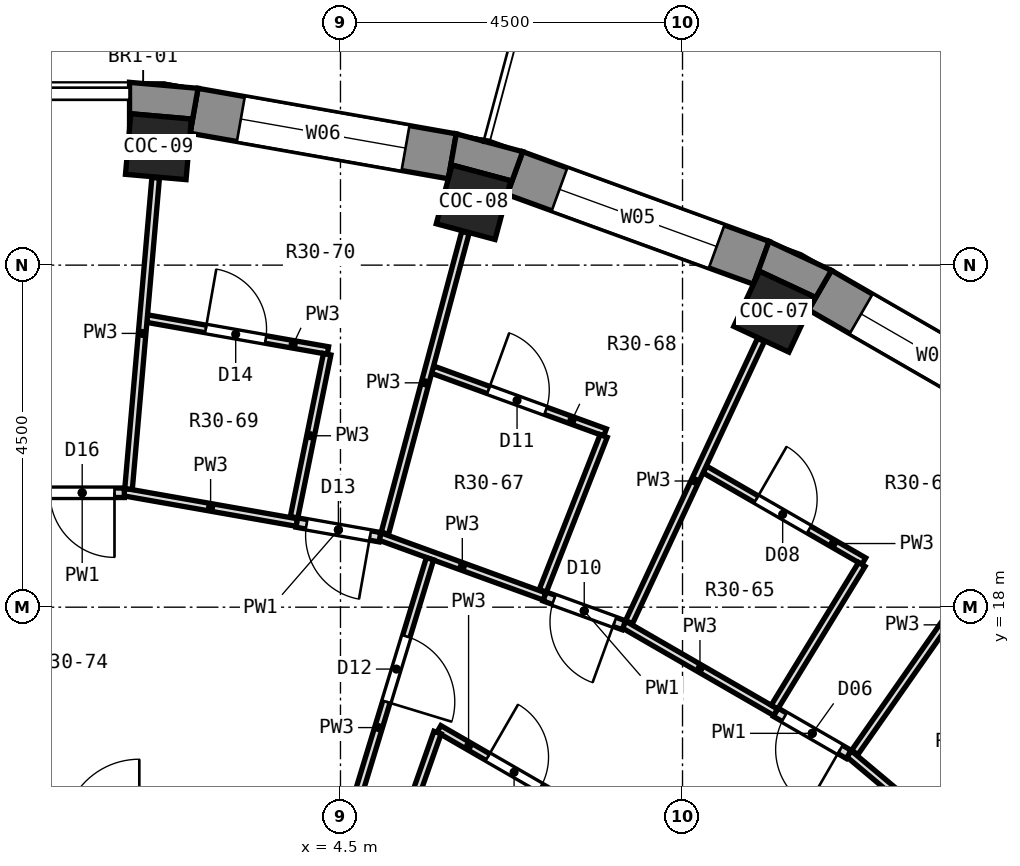
"""IFC4 building model, lengths in metres.
Left out: names, types, materials, properties, quantities, classifications, styles, units other than length and angle.
Written with IfcOpenShell. Run it as: python <this file> out.ifc"""

import sys

from ifc_helpers import new_model, si_unit, direction, frame, frame_2d, origin, origin_2d, place, context, subcontext, project, spatial, polyline, rectangle, outline, extrude, element, fill, save


model = new_model("IFC4")
c1 = context("Model", 3, precision=1e-05, world=origin(), true_north=direction((0.0, 1.0)))
c2 = subcontext(c1, "Body", "Model", "MODEL_VIEW")
j1 = project(units=[si_unit("LENGTHUNIT", "METRE"), si_unit("PLANEANGLEUNIT", "RADIAN")], contexts=[c1])
p1 = place(None, origin())
s1 = spatial("IfcSite", under=j1, at=p1, CompositionType="ELEMENT")
p2 = place(p1, origin())
s2 = spatial("IfcBuilding", under=s1, at=p2, CompositionType="ELEMENT")
p3 = place(p2, frame((0.0, 0.0, 210.3)))
s3 = spatial("IfcBuildingStorey", under=s2, at=p3, CompositionType="ELEMENT", Elevation=210.3)
for number, where, z_axis, x_axis in (
    (1, (10.206, 21.887, 0.0), (0.0, 0.0, 1.0), (0.423, 0.906, 0.0)),
    (2, (6.25, 23.327, 0.0), (0.0, 0.0, 1.0), (0.259, 0.966, 0.0)),
    (3, (2.105, 24.058, 0.0), (0.0, 0.0, 1.0), (0.087, 0.996, 0.0)),
):
    element("IfcColumn", number, at=place(p3, frame(where, z_axis=z_axis, x_axis=x_axis)), inside=s3, PredefinedType="COLUMN", context=c2, shape_type="SweptSolid", body=[
        extrude(rectangle(XDim=0.8, YDim=0.8, at=origin_2d()), origin(), (0.0, 0.0, 1.0), 3.3),
    ])
p4 = place(p3, frame((13.796, 20.446, 0.0), z_axis=(0.0, 0.0, 1.0), x_axis=(-0.86602648383, 0.499998129301, 0.0)))
e4 = element("IfcWall", 4, at=p4, inside=s3, PredefinedType="SOLIDWALL", context=c2, shape_type="SweptSolid", body=[
    extrude(rectangle(XDim=3.45, YDim=0.6, at=frame_2d((1.725, 0.0))), origin(), (0.0, 0.0, 1.0), 2.85),
])
p5 = place(p4, frame((0.625, 0.0, 0.9)))
e5 = element("IfcOpeningElement", 5, at=p5, cuts=e4, PredefinedType="OPENING", context=c2, shape_type="SweptSolid", body=[
    extrude(rectangle(XDim=2.2, YDim=1.8, at=frame_2d((1.1, 0.9))), frame((0.0, 0.312, 0.0), z_axis=(0.0, -1.0, 0.0), x_axis=(1.0, 0.0, 0.0)), (0.0, 0.0, 1.0), 0.624),
])
p6 = place(p3, frame((10.036, 22.531, 0.0), z_axis=(0.0, 0.0, 1.0), x_axis=(-0.93968799822, 0.342032843455, 0.0)))
e6 = element("IfcWall", 6, at=p6, inside=s3, PredefinedType="SOLIDWALL", context=c2, shape_type="SweptSolid", body=[
    extrude(rectangle(XDim=3.45, YDim=0.6, at=frame_2d((1.725, 0.0))), origin(), (0.0, 0.0, 1.0), 2.85),
])
p7 = place(p6, frame((0.625, 0.0, 0.9)))
e7 = element("IfcOpeningElement", 7, at=p7, cuts=e6, PredefinedType="OPENING", context=c2, shape_type="SweptSolid", body=[
    extrude(rectangle(XDim=2.2, YDim=1.8, at=frame_2d((1.1, 0.9))), frame((0.0, 0.312, 0.0), z_axis=(0.0, -1.0, 0.0), x_axis=(1.0, 0.0, 0.0)), (0.0, 0.0, 1.0), 0.624),
])
p8 = place(p3, frame((5.971, 23.932, 0.0), z_axis=(0.0, 0.0, 1.0), x_axis=(-0.984814892183, 0.173607684551, 0.0)))
e8 = element("IfcWall", 8, at=p8, inside=s3, PredefinedType="SOLIDWALL", context=c2, shape_type="SweptSolid", body=[
    extrude(rectangle(XDim=3.45, YDim=0.6, at=frame_2d((1.725, 0.0))), origin(), (0.0, 0.0, 1.0), 2.85),
])
p9 = place(p8, frame((0.625, 0.0, 0.9)))
e9 = element("IfcOpeningElement", 9, at=p9, cuts=e8, PredefinedType="OPENING", context=c2, shape_type="SweptSolid", body=[
    extrude(rectangle(XDim=2.2, YDim=1.8, at=frame_2d((1.1, 0.9))), frame((0.0, 0.312, 0.0), z_axis=(0.0, -1.0, 0.0), x_axis=(1.0, 0.0, 0.0)), (0.0, 0.0, 1.0), 0.624),
])
p10 = place(p3, origin())
e10 = element("IfcWall", 10, at=p10, inside=s3, PredefinedType="SOLIDWALL", context=c2, shape_type="SweptSolid", body=[
    extrude(outline(polyline([(10.139, 22.813), (9.934, 22.249), (10.013, 22.419), (10.738, 22.081), (10.659, 21.911), (10.959, 22.431), (10.139, 22.813)])), origin(), (0.0, 0.0, 1.0), 2.85),
])
p11 = place(p3, origin())
e11 = element("IfcWall", 11, at=p11, inside=s3, PredefinedType="SOLIDWALL", context=c2, shape_type="SweptSolid", body=[
    extrude(outline(polyline([(6.023, 24.227), (5.919, 23.636), (5.968, 23.817), (6.74, 23.61), (6.692, 23.429), (6.897, 23.993), (6.023, 24.227)])), origin(), (0.0, 0.0, 1.0), 2.85),
])
p12 = place(p3, origin())
e12 = element("IfcWall", 12, at=p12, inside=s3, PredefinedType="SOLIDWALL", context=c2, shape_type="SweptSolid", body=[
    extrude(outline(polyline([(2.626, 24.826), (1.725, 24.905), (1.725, 24.305), (1.741, 24.491), (2.538, 24.422), (2.522, 24.235), (2.626, 24.826)])), origin(), (0.0, 0.0, 1.0), 2.85),
])
p13 = place(p3, frame((11.191, 16.071, 0.0), z_axis=(0.0, 0.0, 1.0), x_axis=(0.766099024104, -0.642722556993, 0.0)))
e13 = element("IfcWall", 13, at=p13, inside=s3, PredefinedType="PARTITIONING", context=c2, shape_type="SweptSolid", body=[
    extrude(rectangle(XDim=2.305, YDim=0.1, at=frame_2d((1.153, 0.0))), origin(), (0.0, 0.0, 1.0), 2.85),
])
p14 = place(p3, frame((5.796, 16.399, 0.0), z_axis=(0.0, 0.0, 1.0), x_axis=(0.866084140742, -0.499898250802, 0.0)))
e14 = element("IfcWall", 14, at=p14, inside=s3, PredefinedType="PARTITIONING", context=c2, shape_type="SweptSolid", body=[
    extrude(rectangle(XDim=2.284, YDim=0.1, at=frame_2d((1.142, 0.0))), origin(), (0.0, 0.0, 1.0), 2.85),
])
p15 = place(p14, frame((0.741, 0.0, 0.0)))
e15 = element("IfcOpeningElement", 15, at=p15, cuts=e14, PredefinedType="OPENING", context=c2, shape_type="SweptSolid", body=[
    extrude(rectangle(XDim=0.8, YDim=2.1, at=frame_2d((0.4, 1.05))), frame((0.0, 0.062, 0.0), z_axis=(0.0, -1.0, 0.0), x_axis=(1.0, 0.0, 0.0)), (0.0, 0.0, 1.0), 0.124),
])
p16 = place(p3, frame((8.231, 17.771, 0.0), z_axis=(0.0, 0.0, 1.0), x_axis=(0.865906868937, -0.5002052522, 0.0)))
e16 = element("IfcWall", 16, at=p16, inside=s3, PredefinedType="PARTITIONING", context=c2, shape_type="SweptSolid", body=[
    extrude(rectangle(XDim=2.305, YDim=0.1, at=frame_2d((1.153, 0.0))), origin(), (0.0, 0.0, 1.0), 2.85),
])
p17 = place(p3, frame((10.227, 16.617, 0.0), z_axis=(0.0, 0.0, 1.0), x_axis=(0.865888396158, -0.500237229121, 0.0)))
e17 = element("IfcWall", 17, at=p17, inside=s3, PredefinedType="PARTITIONING", context=c2, shape_type="SweptSolid", body=[
    extrude(rectangle(XDim=1.108, YDim=0.125, at=frame_2d((0.554, 0.0))), origin(), (0.0, 0.0, 1.0), 2.85),
])
p18 = place(p17, frame((0.129, 0.0, 0.0)))
e18 = element("IfcOpeningElement", 18, at=p18, cuts=e17, PredefinedType="OPENING", context=c2, shape_type="SweptSolid", body=[
    extrude(rectangle(XDim=0.85, YDim=2.1, at=frame_2d((0.425, 1.05))), frame((0.0, 0.074, 0.0), z_axis=(0.0, -1.0, 0.0), x_axis=(1.0, 0.0, 0.0)), (0.0, 0.0, 1.0), 0.149),
])
p19 = place(p3, frame((9.293, 19.812, 0.0), z_axis=(0.0, 0.0, 1.0), x_axis=(0.866145191815, -0.499792463624, 0.0)))
e19 = element("IfcWall", 19, at=p19, inside=s3, PredefinedType="PARTITIONING", context=c2, shape_type="SweptSolid", body=[
    extrude(rectangle(XDim=2.415, YDim=0.1, at=frame_2d((1.208, 0.0))), origin(), (0.0, 0.0, 1.0), 2.85),
])
p20 = place(p19, frame((0.782, 0.0, 0.0)))
e20 = element("IfcOpeningElement", 20, at=p20, cuts=e19, PredefinedType="OPENING", context=c2, shape_type="SweptSolid", body=[
    extrude(rectangle(XDim=0.8, YDim=2.1, at=frame_2d((0.4, 1.05))), frame((0.0, 0.062, 0.0), z_axis=(0.0, -1.0, 0.0), x_axis=(1.0, 0.0, 0.0)), (0.0, 0.0, 1.0), 0.124),
])
p21 = place(p3, frame((5.02, 18.929, 0.0), z_axis=(0.0, 0.0, 1.0), x_axis=(0.939651079277, -0.342134256123, 0.0)))
e21 = element("IfcWall", 21, at=p21, inside=s3, PredefinedType="PARTITIONING", context=c2, shape_type="SweptSolid", body=[
    extrude(rectangle(XDim=2.305, YDim=0.1, at=frame_2d((1.152, 0.0))), origin(), (0.0, 0.0, 1.0), 2.85),
])
p22 = place(p3, frame((7.186, 18.141, 0.0), z_axis=(0.0, 0.0, 1.0), x_axis=(0.939793423488, -0.341743063087, 0.0)))
e22 = element("IfcWall", 22, at=p22, inside=s3, PredefinedType="PARTITIONING", context=c2, shape_type="SweptSolid", body=[
    extrude(rectangle(XDim=1.109, YDim=0.125, at=frame_2d((0.554, 0.0))), origin(), (0.0, 0.0, 1.0), 2.85),
])
p23 = place(p22, frame((0.129, 0.0, 0.0)))
e23 = element("IfcOpeningElement", 23, at=p23, cuts=e22, PredefinedType="OPENING", context=c2, shape_type="SweptSolid", body=[
    extrude(rectangle(XDim=0.85, YDim=2.1, at=frame_2d((0.425, 1.05))), frame((0.0, 0.074, 0.0), z_axis=(0.0, -1.0, 0.0), x_axis=(1.0, 0.0, 0.0)), (0.0, 0.0, 1.0), 0.149),
])
p24 = place(p3, frame((5.712, 21.125, 0.0), z_axis=(0.0, 0.0, 1.0), x_axis=(0.939692991858, -0.342019123812, 0.0)))
e24 = element("IfcWall", 24, at=p24, inside=s3, PredefinedType="PARTITIONING", context=c2, shape_type="SweptSolid", body=[
    extrude(rectangle(XDim=2.414, YDim=0.1, at=frame_2d((1.207, 0.0))), origin(), (0.0, 0.0, 1.0), 2.85),
])
p25 = place(p24, frame((0.782, 0.0, 0.0)))
e25 = element("IfcOpeningElement", 25, at=p25, cuts=e24, PredefinedType="OPENING", context=c2, shape_type="SweptSolid", body=[
    extrude(rectangle(XDim=0.8, YDim=2.1, at=frame_2d((0.4, 1.05))), frame((0.0, 0.062, 0.0), z_axis=(0.0, -1.0, 0.0), x_axis=(1.0, 0.0, 0.0)), (0.0, 0.0, 1.0), 0.124),
])
p26 = place(p3, frame((1.656, 19.514, 0.0), z_axis=(0.0, 0.0, 1.0), x_axis=(0.984783558818, -0.173785333909, 0.0)))
e26 = element("IfcWall", 26, at=p26, inside=s3, PredefinedType="PARTITIONING", context=c2, shape_type="SweptSolid", body=[
    extrude(rectangle(XDim=2.305, YDim=0.1, at=frame_2d((1.153, 0.0))), origin(), (0.0, 0.0, 1.0), 2.85),
])
p27 = place(p3, frame((3.926, 19.113, 0.0), z_axis=(0.0, 0.0, 1.0), x_axis=(0.984810132848, -0.173634680406, 0.0)))
e27 = element("IfcWall", 27, at=p27, inside=s3, PredefinedType="PARTITIONING", context=c2, shape_type="SweptSolid", body=[
    extrude(rectangle(XDim=1.109, YDim=0.125, at=frame_2d((0.555, 0.0))), origin(), (0.0, 0.0, 1.0), 2.85),
])
p28 = place(p27, frame((0.13, 0.0, 0.0)))
e28 = element("IfcOpeningElement", 28, at=p28, cuts=e27, PredefinedType="OPENING", context=c2, shape_type="SweptSolid", body=[
    extrude(rectangle(XDim=0.85, YDim=2.1, at=frame_2d((0.425, 1.05))), frame((0.0, 0.074, 0.0), z_axis=(0.0, -1.0, 0.0), x_axis=(1.0, 0.0, 0.0)), (0.0, 0.0, 1.0), 0.149),
])
p29 = place(p3, frame((1.957, 21.796, 0.0), z_axis=(0.0, 0.0, 1.0), x_axis=(0.984794754479, -0.173721879884, 0.0)))
e29 = element("IfcWall", 29, at=p29, inside=s3, PredefinedType="PARTITIONING", context=c2, shape_type="SweptSolid", body=[
    extrude(rectangle(XDim=2.414, YDim=0.1, at=frame_2d((1.207, 0.0))), origin(), (0.0, 0.0, 1.0), 2.85),
])
p30 = place(p29, frame((0.782, 0.0, 0.0)))
e30 = element("IfcOpeningElement", 30, at=p30, cuts=e29, PredefinedType="OPENING", context=c2, shape_type="SweptSolid", body=[
    extrude(rectangle(XDim=0.8, YDim=2.1, at=frame_2d((0.4, 1.05))), frame((0.0, 0.062, 0.0), z_axis=(0.0, -1.0, 0.0), x_axis=(1.0, 0.0, 0.0)), (0.0, 0.0, 1.0), 0.124),
])
p31 = place(p3, frame((0.548, 19.505, 0.0), z_axis=(0.0, 0.0, 1.0), x_axis=(1.0, 0.0, 0.0)))
e31 = element("IfcWall", 31, at=p31, inside=s3, PredefinedType="PARTITIONING", context=c2, shape_type="SweptSolid", body=[
    extrude(rectangle(XDim=1.108, YDim=0.125, at=frame_2d((0.554, 0.0))), origin(), (0.0, 0.0, 1.0), 2.85),
])
p32 = place(p31, frame((0.129, 0.0, 0.0)))
e32 = element("IfcOpeningElement", 32, at=p32, cuts=e31, PredefinedType="OPENING", context=c2, shape_type="SweptSolid", body=[
    extrude(rectangle(XDim=0.85, YDim=2.1, at=frame_2d((0.425, 1.05))), frame((0.0, 0.074, 0.0), z_axis=(0.0, -1.0, 0.0), x_axis=(1.0, 0.0, 0.0)), (0.0, 0.0, 1.0), 0.149),
])
p33 = place(p3, frame((11.266, 16.089, 0.0), z_axis=(0.0, 0.0, 1.0), x_axis=(0.573606249772, 0.819131167898, 0.0)))
e33 = element("IfcWall", 33, at=p33, inside=s3, PredefinedType="PARTITIONING", context=c2, shape_type="SweptSolid", body=[
    extrude(rectangle(XDim=4.099, YDim=0.1, at=frame_2d((2.049, 0.0))), origin(), (0.0, 0.0, 1.0), 2.85),
])
p34 = place(p3, frame((10.21, 16.686, 0.0), z_axis=(0.0, 0.0, 1.0), x_axis=(0.522046798857, 0.852916842256, 0.0)))
e34 = element("IfcWall", 34, at=p34, inside=s3, PredefinedType="PARTITIONING", context=c2, shape_type="SweptSolid", body=[
    extrude(rectangle(XDim=2.2, YDim=0.1, at=frame_2d((1.1, 0.0))), origin(), (0.0, 0.0, 1.0), 2.85),
])
p35 = place(p3, frame((8.297, 17.804, 0.0), z_axis=(0.0, 0.0, 1.0), x_axis=(0.423514808753, 0.90588918018, 0.0)))
e35 = element("IfcWall", 35, at=p35, inside=s3, PredefinedType="PARTITIONING", context=c2, shape_type="SweptSolid", body=[
    extrude(rectangle(XDim=4.098, YDim=0.1, at=frame_2d((2.049, 0.0))), origin(), (0.0, 0.0, 1.0), 2.85),
])
p36 = place(p3, frame((7.162, 18.216, 0.0), z_axis=(0.0, 0.0, 1.0), x_axis=(0.365959579046, 0.930630746593, 0.0)))
e36 = element("IfcWall", 36, at=p36, inside=s3, PredefinedType="PARTITIONING", context=c2, shape_type="SweptSolid", body=[
    extrude(rectangle(XDim=2.188, YDim=0.1, at=frame_2d((1.094, 0.0))), origin(), (0.0, 0.0, 1.0), 2.85),
])
p37 = place(p3, frame((5.103, 14.445, 0.0), z_axis=(0.0, 0.0, 1.0), x_axis=(0.333281339962, 0.942827422402, 0.0)))
e37 = element("IfcWall", 37, at=p37, inside=s3, PredefinedType="PARTITIONING", context=c2, shape_type="SweptSolid", body=[
    extrude(rectangle(XDim=2.021, YDim=0.1, at=frame_2d((1.01, 0.0))), origin(), (0.0, 0.0, 1.0), 2.85),
])
p38 = place(p3, frame((4.505, 14.79, 0.0), z_axis=(0.0, 0.0, 1.0), x_axis=(0.291610860107, 0.956537038628, 0.0)))
e38 = element("IfcWall", 38, at=p38, inside=s3, PredefinedType="PARTITIONING", context=c2, shape_type="SweptSolid", body=[
    extrude(rectangle(XDim=4.022, YDim=0.1, at=frame_2d((2.011, 0.0))), origin(), (0.0, 0.0, 1.0), 2.85),
])
p39 = place(p38, frame((2.055, 0.0, 0.0)))
e39 = element("IfcOpeningElement", 39, at=p39, cuts=e38, PredefinedType="OPENING", context=c2, shape_type="SweptSolid", body=[
    extrude(rectangle(XDim=0.9, YDim=2.1, at=frame_2d((0.45, 1.05))), frame((0.0, 0.062, 0.0), z_axis=(0.0, -1.0, 0.0), x_axis=(1.0, 0.0, 0.0)), (0.0, 0.0, 1.0), 0.124),
])
p40 = place(p3, frame((5.084, 18.972, 0.0), z_axis=(0.0, 0.0, 1.0), x_axis=(0.258608038295, 0.965982340692, 0.0)))
e40 = element("IfcWall", 40, at=p40, inside=s3, PredefinedType="PARTITIONING", context=c2, shape_type="SweptSolid", body=[
    extrude(rectangle(XDim=4.098, YDim=0.1, at=frame_2d((2.049, 0.0))), origin(), (0.0, 0.0, 1.0), 2.85),
])
p41 = place(p3, frame((3.889, 19.183, 0.0), z_axis=(0.0, 0.0, 1.0), x_axis=(0.199033137994, 0.979992760167, 0.0)))
e41 = element("IfcWall", 41, at=p41, inside=s3, PredefinedType="PARTITIONING", context=c2, shape_type="SweptSolid", body=[
    extrude(rectangle(XDim=2.188, YDim=0.1, at=frame_2d((1.094, 0.0))), origin(), (0.0, 0.0, 1.0), 2.85),
])
p42 = place(p3, frame((1.712, 19.555, 0.0), z_axis=(0.0, 0.0, 1.0), x_axis=(0.086893599578, 0.996217597893, 0.0)))
e42 = element("IfcWall", 42, at=p42, inside=s3, PredefinedType="PARTITIONING", context=c2, shape_type="SweptSolid", body=[
    extrude(rectangle(XDim=4.111, YDim=0.1, at=frame_2d((2.055, 0.0))), origin(), (0.0, 0.0, 1.0), 2.85),
])
p43 = place(p5, origin())
e43 = element("IfcWindow", 43, at=p43, inside=s3, PartitioningType="SINGLE_PANEL", PredefinedType="WINDOW", context=c2, shape_type="SweptSolid", body=[
    extrude(rectangle(XDim=2.2, YDim=1.8, at=frame_2d((1.1, 0.9))), frame((0.0, 0.18, 0.0), z_axis=(0.0, -1.0, 0.0), x_axis=(1.0, 0.0, 0.0)), (0.0, 0.0, 1.0), 0.06),
])
fill(e5, e43)
p44 = place(p7, origin())
e44 = element("IfcWindow", 44, at=p44, inside=s3, PartitioningType="SINGLE_PANEL", PredefinedType="WINDOW", context=c2, shape_type="SweptSolid", body=[
    extrude(rectangle(XDim=2.2, YDim=1.8, at=frame_2d((1.1, 0.9))), frame((0.0, 0.18, 0.0), z_axis=(0.0, -1.0, 0.0), x_axis=(1.0, 0.0, 0.0)), (0.0, 0.0, 1.0), 0.06),
])
fill(e7, e44)
p45 = place(p9, origin())
e45 = element("IfcWindow", 45, at=p45, inside=s3, PartitioningType="SINGLE_PANEL", PredefinedType="WINDOW", context=c2, shape_type="SweptSolid", body=[
    extrude(rectangle(XDim=2.2, YDim=1.8, at=frame_2d((1.1, 0.9))), frame((0.0, 0.18, 0.0), z_axis=(0.0, -1.0, 0.0), x_axis=(1.0, 0.0, 0.0)), (0.0, 0.0, 1.0), 0.06),
])
fill(e9, e45)
p46 = place(p18, frame((0.85, 0.0, 0.0), z_axis=(0.0, 0.0, 1.0), x_axis=(-1.0, 0.0, 0.0)))
e46 = element("IfcDoor", 46, at=p46, inside=s3, OperationType="SINGLE_SWING_LEFT", PredefinedType="DOOR", context=c2, shape_type="SweptSolid", body=[
    extrude(rectangle(XDim=0.85, YDim=2.1, at=frame_2d((0.425, 1.05))), frame((0.0, 0.025, 0.0), z_axis=(0.0, -1.0, 0.0), x_axis=(1.0, 0.0, 0.0)), (0.0, 0.0, 1.0), 0.05),
])
fill(e18, e46)
p47 = place(p20, origin())
e47 = element("IfcDoor", 47, at=p47, inside=s3, OperationType="SINGLE_SWING_LEFT", PredefinedType="DOOR", context=c2, shape_type="SweptSolid", body=[
    extrude(rectangle(XDim=0.8, YDim=2.1, at=frame_2d((0.4, 1.05))), frame((0.0, 0.025, 0.0), z_axis=(0.0, -1.0, 0.0), x_axis=(1.0, 0.0, 0.0)), (0.0, 0.0, 1.0), 0.05),
])
fill(e20, e47)
p48 = place(p15, origin())
e48 = element("IfcDoor", 48, at=p48, inside=s3, OperationType="SINGLE_SWING_LEFT", PredefinedType="DOOR", context=c2, shape_type="SweptSolid", body=[
    extrude(rectangle(XDim=0.8, YDim=2.1, at=frame_2d((0.4, 1.05))), frame((0.0, 0.025, 0.0), z_axis=(0.0, -1.0, 0.0), x_axis=(1.0, 0.0, 0.0)), (0.0, 0.0, 1.0), 0.05),
])
fill(e15, e48)
p49 = place(p23, frame((0.85, 0.0, 0.0), z_axis=(0.0, 0.0, 1.0), x_axis=(-1.0, 0.0, 0.0)))
e49 = element("IfcDoor", 49, at=p49, inside=s3, OperationType="SINGLE_SWING_LEFT", PredefinedType="DOOR", context=c2, shape_type="SweptSolid", body=[
    extrude(rectangle(XDim=0.85, YDim=2.1, at=frame_2d((0.425, 1.05))), frame((0.0, 0.025, 0.0), z_axis=(0.0, -1.0, 0.0), x_axis=(1.0, 0.0, 0.0)), (0.0, 0.0, 1.0), 0.05),
])
fill(e23, e49)
p50 = place(p25, origin())
e50 = element("IfcDoor", 50, at=p50, inside=s3, OperationType="SINGLE_SWING_LEFT", PredefinedType="DOOR", context=c2, shape_type="SweptSolid", body=[
    extrude(rectangle(XDim=0.8, YDim=2.1, at=frame_2d((0.4, 1.05))), frame((0.0, 0.025, 0.0), z_axis=(0.0, -1.0, 0.0), x_axis=(1.0, 0.0, 0.0)), (0.0, 0.0, 1.0), 0.05),
])
fill(e25, e50)
p51 = place(p39, frame((0.9, 0.0, 0.0), z_axis=(0.0, 0.0, 1.0), x_axis=(-1.0, 0.0, 0.0)))
e51 = element("IfcDoor", 51, at=p51, inside=s3, OperationType="SINGLE_SWING_RIGHT", PredefinedType="DOOR", context=c2, shape_type="SweptSolid", body=[
    extrude(rectangle(XDim=0.9, YDim=2.1, at=frame_2d((0.45, 1.05))), frame((0.0, 0.025, 0.0), z_axis=(0.0, -1.0, 0.0), x_axis=(1.0, 0.0, 0.0)), (0.0, 0.0, 1.0), 0.05),
])
fill(e39, e51)
p52 = place(p28, frame((0.85, 0.0, 0.0), z_axis=(0.0, 0.0, 1.0), x_axis=(-1.0, 0.0, 0.0)))
e52 = element("IfcDoor", 52, at=p52, inside=s3, OperationType="SINGLE_SWING_LEFT", PredefinedType="DOOR", context=c2, shape_type="SweptSolid", body=[
    extrude(rectangle(XDim=0.85, YDim=2.1, at=frame_2d((0.425, 1.05))), frame((0.0, 0.025, 0.0), z_axis=(0.0, -1.0, 0.0), x_axis=(1.0, 0.0, 0.0)), (0.0, 0.0, 1.0), 0.05),
])
fill(e28, e52)
p53 = place(p30, origin())
e53 = element("IfcDoor", 53, at=p53, inside=s3, OperationType="SINGLE_SWING_LEFT", PredefinedType="DOOR", context=c2, shape_type="SweptSolid", body=[
    extrude(rectangle(XDim=0.8, YDim=2.1, at=frame_2d((0.4, 1.05))), frame((0.0, 0.025, 0.0), z_axis=(0.0, -1.0, 0.0), x_axis=(1.0, 0.0, 0.0)), (0.0, 0.0, 1.0), 0.05),
])
fill(e30, e53)
p54 = place(p32, frame((0.85, 0.0, 0.0), z_axis=(0.0, 0.0, 1.0), x_axis=(-1.0, 0.0, 0.0)))
e54 = element("IfcDoor", 54, at=p54, inside=s3, OperationType="SINGLE_SWING_LEFT", PredefinedType="DOOR", context=c2, shape_type="SweptSolid", body=[
    extrude(rectangle(XDim=0.85, YDim=2.1, at=frame_2d((0.425, 1.05))), frame((0.0, 0.025, 0.0), z_axis=(0.0, -1.0, 0.0), x_axis=(1.0, 0.0, 0.0)), (0.0, 0.0, 1.0), 0.05),
])
fill(e32, e54)
save(model, sys.argv[1])
